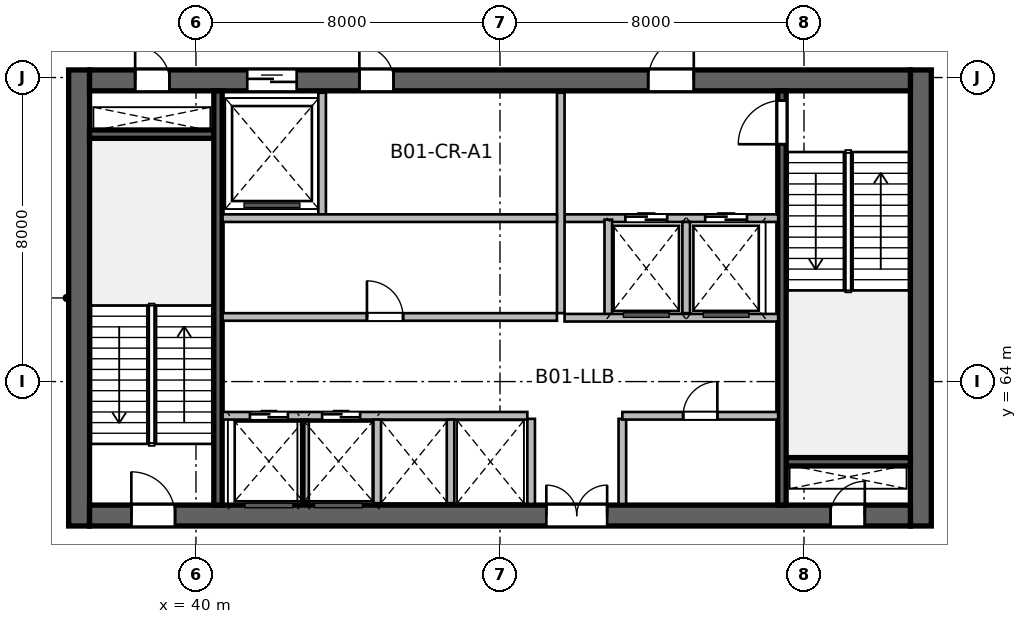
"""IFC4 building model, lengths in metres.
Left out: names, types, materials, properties, quantities, classifications, styles, units other than length and angle.
Written with IfcOpenShell. Run it as: python <this file> out.ifc"""

import sys

from ifc_helpers import new_model, si_unit, direction, frame, frame_2d, origin, place, context, subcontext, project, spatial, rectangle, extrude, source, transform, mapped, element, fill, save


model = new_model("IFC4")
c1 = context("Model", 3, precision=1e-05, world=origin(), true_north=direction((0.0, 1.0)))
c2 = subcontext(c1, "Body", "Model", "MODEL_VIEW")
j1 = project(units=[si_unit("LENGTHUNIT", "METRE"), si_unit("PLANEANGLEUNIT", "RADIAN")], contexts=[c1])
p1 = place(None, origin())
s1 = spatial("IfcSite", under=j1, at=p1, CompositionType="ELEMENT")
p2 = place(p1, origin())
s2 = spatial("IfcBuilding", under=s1, at=p2, CompositionType="ELEMENT")
p3 = place(p2, frame((0.0, 0.0, -5.0)))
s3 = spatial("IfcBuildingStorey", under=s2, at=p3, CompositionType="ELEMENT", Elevation=-5.0)
m1 = source(origin(), c2, "Body", "SweptSolid", [
    extrude(rectangle(XDim=12.0, YDim=0.55, at=frame_2d((6.0, 0.0))), origin(), (0.0, 0.0, 1.0), 5.0),
])
for number, where, z_axis, x_axis in (
    (1, (36.925, 60.2, 0.0), (0.0, 0.0, 1.0), (0.0, 1.0, 0.0)),
    (2, (59.075, 60.2, 0.0), (0.0, 0.0, 1.0), (0.0, 1.0, 0.0)),
):
    element("IfcWall", number, at=place(p3, frame(where, z_axis=z_axis, x_axis=x_axis)), inside=s3, PredefinedType="SHEAR", context=c2, shape_type="MappedRepresentation", body=[
        mapped(m1, transform((0.0, 0.0, 0.0), scale=1.0)),
    ])
m2 = source(origin(), c2, "Body", "SweptSolid", [
    extrude(rectangle(XDim=21.6, YDim=0.55, at=frame_2d((10.8, 0.0))), origin(), (0.0, 0.0, 1.0), 5.0),
])
p4 = place(p3, frame((37.2, 60.475, 0.0), z_axis=(0.0, 0.0, 1.0), x_axis=(1.0, 0.0, 0.0)))
e3 = element("IfcWall", 3, at=p4, inside=s3, PredefinedType="SHEAR", context=c2, shape_type="MappedRepresentation", body=[
    mapped(m2, transform((0.0, 0.0, 0.0), scale=1.0)),
])
p5 = place(p4, frame((1.1, 0.0, 0.0)))
e4 = element("IfcOpeningElement", 4, at=p5, cuts=e3, PredefinedType="OPENING", context=c2, shape_type="SweptSolid", body=[
    extrude(rectangle(XDim=1.15, YDim=2.15, at=frame_2d((0.575, 1.075))), frame((0.0, 0.285, 0.0), z_axis=(0.0, -1.0, 0.0), x_axis=(1.0, 0.0, 0.0)), (0.0, 0.0, 1.0), 0.57),
])
p6 = place(p4, frame((19.5, 0.0, 0.0)))
e5 = element("IfcOpeningElement", 5, at=p6, cuts=e3, PredefinedType="OPENING", context=c2, shape_type="SweptSolid", body=[
    extrude(rectangle(XDim=0.9, YDim=2.1, at=frame_2d((0.45, 1.05))), frame((0.0, 0.285, 0.0), z_axis=(0.0, -1.0, 0.0), x_axis=(1.0, 0.0, 0.0)), (0.0, 0.0, 1.0), 0.57),
])
p7 = place(p4, frame((12.02, 0.0, 0.0)))
e6 = element("IfcOpeningElement", 6, at=p7, cuts=e3, PredefinedType="OPENING", context=c2, shape_type="SweptSolid", body=[
    extrude(rectangle(XDim=1.6, YDim=2.15, at=frame_2d((0.8, 1.075))), frame((0.0, 0.285, 0.0), z_axis=(0.0, -1.0, 0.0), x_axis=(1.0, 0.0, 0.0)), (0.0, 0.0, 1.0), 0.57),
])
p8 = place(p3, frame((37.2, 71.925, 0.0), z_axis=(0.0, 0.0, 1.0), x_axis=(1.0, 0.0, 0.0)))
e7 = element("IfcWall", 7, at=p8, inside=s3, PredefinedType="SHEAR", context=c2, shape_type="MappedRepresentation", body=[
    mapped(m2, transform((0.0, 0.0, 0.0), scale=1.0)),
])
p9 = place(p8, frame((1.2, 0.0, 0.0)))
e8 = element("IfcOpeningElement", 8, at=p9, cuts=e7, PredefinedType="OPENING", context=c2, shape_type="SweptSolid", body=[
    extrude(rectangle(XDim=0.9, YDim=2.1, at=frame_2d((0.45, 1.05))), frame((0.0, 0.285, 0.0), z_axis=(0.0, -1.0, 0.0), x_axis=(1.0, 0.0, 0.0)), (0.0, 0.0, 1.0), 0.57),
])
p10 = place(p8, frame((14.7, 0.0, 0.0)))
e9 = element("IfcOpeningElement", 9, at=p10, cuts=e7, PredefinedType="OPENING", context=c2, shape_type="SweptSolid", body=[
    extrude(rectangle(XDim=1.2, YDim=2.15, at=frame_2d((0.6, 1.075))), frame((0.0, 0.285, 0.0), z_axis=(0.0, -1.0, 0.0), x_axis=(1.0, 0.0, 0.0)), (0.0, 0.0, 1.0), 0.57),
])
p11 = place(p8, frame((4.15, 0.0, 0.0)))
e10 = element("IfcOpeningElement", 10, at=p11, cuts=e7, PredefinedType="OPENING", context=c2, shape_type="SweptSolid", body=[
    extrude(rectangle(XDim=1.3, YDim=2.15, at=frame_2d((0.65, 1.075))), frame((0.0, 0.285, 0.0), z_axis=(0.0, -1.0, 0.0), x_axis=(1.0, 0.0, 0.0)), (0.0, 0.0, 1.0), 0.57),
])
p12 = place(p8, frame((7.1, 0.0, 0.0)))
e11 = element("IfcOpeningElement", 11, at=p12, cuts=e7, PredefinedType="OPENING", context=c2, shape_type="SweptSolid", body=[
    extrude(rectangle(XDim=0.9, YDim=2.1, at=frame_2d((0.45, 1.05))), frame((0.0, 0.285, 0.0), z_axis=(0.0, -1.0, 0.0), x_axis=(1.0, 0.0, 0.0)), (0.0, 0.0, 1.0), 0.57),
])
m3 = source(origin(), c2, "Body", "SweptSolid", [
    extrude(rectangle(XDim=3.27, YDim=0.22, at=frame_2d((1.635, 0.0))), origin(), (0.0, 0.0, 1.0), 5.0),
])
for number, where, z_axis, x_axis in (
    (12, (37.2, 70.51, 0.0), (0.0, 0.0, 1.0), (1.0, 0.0, 0.0)),
    (13, (55.53, 61.89, 0.0), (0.0, 0.0, 1.0), (1.0, 0.0, 0.0)),
):
    element("IfcWall", number, at=place(p3, frame(where, z_axis=z_axis, x_axis=x_axis)), inside=s3, PredefinedType="SHEAR", context=c2, shape_type="MappedRepresentation", body=[
        mapped(m3, transform((0.0, 0.0, 0.0), scale=1.0)),
    ])
m4 = source(origin(), c2, "Body", "SweptSolid", [
    extrude(rectangle(XDim=10.9, YDim=0.22, at=frame_2d((5.45, 0.0))), origin(), (0.0, 0.0, 1.0), 5.0),
])
p13 = place(p3, frame((40.58, 60.75, 0.0), z_axis=(0.0, 0.0, 1.0), x_axis=(0.0, 1.0, 0.0)))
e14 = element("IfcWall", 14, at=p13, inside=s3, PredefinedType="SHEAR", context=c2, shape_type="MappedRepresentation", body=[
    mapped(m4, transform((0.0, 0.0, 0.0), scale=1.0)),
])
p14 = place(p3, frame((55.42, 60.75, 0.0), z_axis=(0.0, 0.0, 1.0), x_axis=(0.0, 1.0, 0.0)))
e15 = element("IfcWall", 15, at=p14, inside=s3, PredefinedType="SHEAR", context=c2, shape_type="MappedRepresentation", body=[
    mapped(m4, transform((0.0, 0.0, 0.0), scale=1.0)),
])
p15 = place(p14, frame((9.495, 0.0, 0.0)))
e16 = element("IfcOpeningElement", 16, at=p15, cuts=e15, PredefinedType="OPENING", context=c2, shape_type="SweptSolid", body=[
    extrude(rectangle(XDim=1.15, YDim=2.15, at=frame_2d((0.575, 1.075))), frame((0.0, 0.12, 0.0), z_axis=(0.0, -1.0, 0.0), x_axis=(1.0, 0.0, 0.0)), (0.0, 0.0, 1.0), 0.24),
])
m5 = source(origin(), c2, "Body", "SweptSolid", [
    extrude(rectangle(XDim=2.24, YDim=0.2, at=frame_2d((1.12, 0.0))), origin(), (0.0, 0.0, 1.0), 4.7),
])
for number, where, z_axis, x_axis in (
    (17, (48.82, 60.78, 0.0), (0.0, 0.0, 1.0), (0.0, 1.0, 0.0)),
    (18, (51.22, 60.78, 0.0), (0.0, 0.0, 1.0), (0.0, 1.0, 0.0)),
):
    element("IfcWall", number, at=place(p3, frame(where, z_axis=z_axis, x_axis=x_axis)), inside=s3, PredefinedType="SOLIDWALL", context=c2, shape_type="MappedRepresentation", body=[
        mapped(m5, transform((0.0, 0.0, 0.0), scale=1.0)),
    ])
m6 = source(origin(), c2, "Body", "SweptSolid", [
    extrude(rectangle(XDim=5.62, YDim=0.2, at=frame_2d((2.81, 0.0))), origin(), (0.0, 0.0, 1.0), 4.7),
])
p16 = place(p3, frame((49.7, 68.3, 0.0), z_axis=(0.0, 0.0, 1.0), x_axis=(1.0, 0.0, 0.0)))
e19 = element("IfcWall", 19, at=p16, inside=s3, PredefinedType="SOLIDWALL", context=c2, shape_type="MappedRepresentation", body=[
    mapped(m6, transform((0.0, 0.0, 0.0), scale=1.0)),
])
p17 = place(p16, frame((1.6, 0.0, 0.0)))
e20 = element("IfcOpeningElement", 20, at=p17, cuts=e19, PredefinedType="OPENING", context=c2, shape_type="SweptSolid", body=[
    extrude(rectangle(XDim=1.1, YDim=2.15, at=frame_2d((0.55, 1.075))), frame((0.0, 0.11, 0.0), z_axis=(0.0, -1.0, 0.0), x_axis=(1.0, 0.0, 0.0)), (0.0, 0.0, 1.0), 0.22),
])
p18 = place(p16, frame((3.7, 0.0, 0.0)))
e21 = element("IfcOpeningElement", 21, at=p18, cuts=e19, PredefinedType="OPENING", context=c2, shape_type="SweptSolid", body=[
    extrude(rectangle(XDim=1.1, YDim=2.15, at=frame_2d((0.55, 1.075))), frame((0.0, 0.11, 0.0), z_axis=(0.0, -1.0, 0.0), x_axis=(1.0, 0.0, 0.0)), (0.0, 0.0, 1.0), 0.22),
])
m7 = source(origin(), c2, "Body", "SweptSolid", [
    extrude(rectangle(XDim=5.8, YDim=0.2, at=frame_2d((2.9, 0.0))), origin(), (0.0, 0.0, 1.0), 4.7),
])
p19 = place(p3, frame((49.6, 65.8, 0.0), z_axis=(0.0, 0.0, 1.0), x_axis=(0.0, 1.0, 0.0)))
e22 = element("IfcWall", 22, at=p19, inside=s3, PredefinedType="SOLIDWALL", context=c2, shape_type="MappedRepresentation", body=[
    mapped(m7, transform((0.0, 0.0, 0.0), scale=1.0)),
])
m8 = source(origin(), c2, "Body", "SweptSolid", [
    extrude(rectangle(XDim=2.58, YDim=0.2, at=frame_2d((1.29, 0.0))), origin(), (0.0, 0.0, 1.0), 4.7),
])
p20 = place(p3, frame((50.85, 65.68, 0.0), z_axis=(0.0, 0.0, 1.0), x_axis=(0.0, 1.0, 0.0)))
e23 = element("IfcWall", 23, at=p20, inside=s3, PredefinedType="SOLIDWALL", context=c2, shape_type="MappedRepresentation", body=[
    mapped(m8, transform((0.0, 0.0, 0.0), scale=1.0)),
])
m9 = source(origin(), c2, "Body", "SweptSolid", [
    extrude(rectangle(XDim=2.4, YDim=0.2, at=frame_2d((1.2, 0.0))), origin(), (0.0, 0.0, 1.0), 4.7),
])
p21 = place(p3, frame((52.9, 65.8, 0.0), z_axis=(0.0, 0.0, 1.0), x_axis=(0.0, 1.0, 0.0)))
e24 = element("IfcWall", 24, at=p21, inside=s3, PredefinedType="SOLIDWALL", context=c2, shape_type="MappedRepresentation", body=[
    mapped(m9, transform((0.0, 0.0, 0.0), scale=1.0)),
])
p22 = place(p3, frame((49.7, 65.68, 0.0), z_axis=(0.0, 0.0, 1.0), x_axis=(1.0, 0.0, 0.0)))
e25 = element("IfcWall", 25, at=p22, inside=s3, PredefinedType="SOLIDWALL", context=c2, shape_type="MappedRepresentation", body=[
    mapped(m6, transform((0.0, 0.0, 0.0), scale=1.0)),
])
m10 = source(origin(), c2, "Body", "SweptSolid", [
    extrude(rectangle(XDim=3.2, YDim=0.2, at=frame_2d((1.6, 0.0))), origin(), (0.0, 0.0, 1.0), 4.7),
])
p23 = place(p3, frame((43.32, 68.4, 0.0), z_axis=(0.0, 0.0, 1.0), x_axis=(0.0, 1.0, 0.0)))
e26 = element("IfcWall", 26, at=p23, inside=s3, PredefinedType="SOLIDWALL", context=c2, shape_type="MappedRepresentation", body=[
    mapped(m10, transform((0.0, 0.0, 0.0), scale=1.0)),
])
m11 = source(origin(), c2, "Body", "SweptSolid", [
    extrude(rectangle(XDim=8.8, YDim=0.2, at=frame_2d((4.4, 0.0))), origin(), (0.0, 0.0, 1.0), 4.7),
])
p24 = place(p3, frame((40.7, 68.3, 0.0), z_axis=(0.0, 0.0, 1.0), x_axis=(1.0, 0.0, 0.0)))
e27 = element("IfcWall", 27, at=p24, inside=s3, PredefinedType="SOLIDWALL", context=c2, shape_type="MappedRepresentation", body=[
    mapped(m11, transform((0.0, 0.0, 0.0), scale=1.0)),
])
m12 = source(origin(), c2, "Body", "SweptSolid", [
    extrude(rectangle(XDim=8.02, YDim=0.2, at=frame_2d((4.01, 0.0))), origin(), (0.0, 0.0, 1.0), 4.7),
])
p25 = place(p3, frame((40.7, 63.1, 0.0), z_axis=(0.0, 0.0, 1.0), x_axis=(1.0, 0.0, 0.0)))
e28 = element("IfcWall", 28, at=p25, inside=s3, PredefinedType="SOLIDWALL", context=c2, shape_type="MappedRepresentation", body=[
    mapped(m12, transform((0.0, 0.0, 0.0), scale=1.0)),
])
p26 = place(p25, frame((0.72, 0.0, 0.0)))
e29 = element("IfcOpeningElement", 29, at=p26, cuts=e28, PredefinedType="OPENING", context=c2, shape_type="SweptSolid", body=[
    extrude(rectangle(XDim=1.0, YDim=2.15, at=frame_2d((0.5, 1.075))), frame((0.0, 0.11, 0.0), z_axis=(0.0, -1.0, 0.0), x_axis=(1.0, 0.0, 0.0)), (0.0, 0.0, 1.0), 0.22),
])
p27 = place(p25, frame((2.62, 0.0, 0.0)))
e30 = element("IfcOpeningElement", 30, at=p27, cuts=e28, PredefinedType="OPENING", context=c2, shape_type="SweptSolid", body=[
    extrude(rectangle(XDim=1.0, YDim=2.15, at=frame_2d((0.5, 1.075))), frame((0.0, 0.11, 0.0), z_axis=(0.0, -1.0, 0.0), x_axis=(1.0, 0.0, 0.0)), (0.0, 0.0, 1.0), 0.22),
])
m13 = source(origin(), c2, "Body", "SweptSolid", [
    extrude(rectangle(XDim=4.1, YDim=0.2, at=frame_2d((2.05, 0.0))), origin(), (0.0, 0.0, 1.0), 4.7),
])
p28 = place(p3, frame((51.22, 63.1, 0.0), z_axis=(0.0, 0.0, 1.0), x_axis=(1.0, 0.0, 0.0)))
e31 = element("IfcWall", 31, at=p28, inside=s3, PredefinedType="SOLIDWALL", context=c2, shape_type="MappedRepresentation", body=[
    mapped(m13, transform((0.0, 0.0, 0.0), scale=1.0)),
])
p29 = place(p28, frame((1.6, 0.0, 0.0)))
e32 = element("IfcOpeningElement", 32, at=p29, cuts=e31, PredefinedType="OPENING", context=c2, shape_type="SweptSolid", body=[
    extrude(rectangle(XDim=0.9, YDim=2.1, at=frame_2d((0.45, 1.05))), frame((0.0, 0.11, 0.0), z_axis=(0.0, -1.0, 0.0), x_axis=(1.0, 0.0, 0.0)), (0.0, 0.0, 1.0), 0.22),
])
m14 = source(origin(), c2, "Body", "SweptSolid", [
    extrude(rectangle(XDim=2.2, YDim=0.2, at=frame_2d((1.1, 0.0))), origin(), (0.0, 0.0, 1.0), 4.7),
])
for number, where, z_axis, x_axis in (
    (33, (42.87, 60.8, 0.0), (0.0, 0.0, 1.0), (0.0, 1.0, 0.0)),
    (34, (44.77, 60.8, 0.0), (0.0, 0.0, 1.0), (0.0, 1.0, 0.0)),
    (35, (46.7, 60.8, 0.0), (0.0, 0.0, 1.0), (0.0, 1.0, 0.0)),
):
    element("IfcWall", number, at=place(p3, frame(where, z_axis=z_axis, x_axis=x_axis)), inside=s3, PredefinedType="SOLIDWALL", context=c2, shape_type="MappedRepresentation", body=[
        mapped(m14, transform((0.0, 0.0, 0.0), scale=1.0)),
    ])
p30 = place(p3, frame((40.7, 65.7, 0.0), z_axis=(0.0, 0.0, 1.0), x_axis=(1.0, 0.0, 0.0)))
e36 = element("IfcWall", 36, at=p30, inside=s3, PredefinedType="SOLIDWALL", context=c2, shape_type="MappedRepresentation", body=[
    mapped(m11, transform((0.0, 0.0, 0.0), scale=1.0)),
])
p31 = place(p30, frame((3.8, 0.0, 0.0)))
e37 = element("IfcOpeningElement", 37, at=p31, cuts=e36, PredefinedType="OPENING", context=c2, shape_type="SweptSolid", body=[
    extrude(rectangle(XDim=0.95, YDim=2.15, at=frame_2d((0.475, 1.075))), frame((0.0, 0.11, 0.0), z_axis=(0.0, -1.0, 0.0), x_axis=(1.0, 0.0, 0.0)), (0.0, 0.0, 1.0), 0.22),
])
m15 = source(origin(), c2, "Body", "SweptSolid", [
    extrude(rectangle(XDim=1.15, YDim=2.15, at=frame_2d((0.575, 1.075))), frame((0.0, 0.025, 0.0), z_axis=(0.0, -1.0, 0.0), x_axis=(1.0, 0.0, 0.0)), (0.0, 0.0, 1.0), 0.05),
])
p32 = place(p5, origin())
e38 = element("IfcDoor", 38, at=p32, inside=s3, OperationType="SINGLE_SWING_LEFT", PredefinedType="DOOR", context=c2, shape_type="MappedRepresentation", body=[
    mapped(m15, transform((0.0, 0.0, 0.0), scale=1.0)),
])
fill(e4, e38)
m16 = source(origin(), c2, "Body", "SweptSolid", [
    extrude(rectangle(XDim=0.9, YDim=2.1, at=frame_2d((0.45, 1.05))), frame((0.0, 0.025, 0.0), z_axis=(0.0, -1.0, 0.0), x_axis=(1.0, 0.0, 0.0)), (0.0, 0.0, 1.0), 0.05),
])
p33 = place(p9, origin())
e39 = element("IfcDoor", 39, at=p33, inside=s3, OperationType="SINGLE_SWING_LEFT", PredefinedType="DOOR", context=c2, shape_type="MappedRepresentation", body=[
    mapped(m16, transform((0.0, 0.0, 0.0), scale=1.0)),
])
fill(e8, e39)
p34 = place(p6, origin())
e40 = element("IfcDoor", 40, at=p34, inside=s3, OperationType="SINGLE_SWING_RIGHT", PredefinedType="DOOR", context=c2, shape_type="MappedRepresentation", body=[
    mapped(m16, transform((0.0, 0.0, 0.0), scale=1.0)),
])
fill(e5, e40)
p35 = place(p15, origin())
e41 = element("IfcDoor", 41, at=p35, inside=s3, OperationType="SINGLE_SWING_LEFT", PredefinedType="DOOR", context=c2, shape_type="MappedRepresentation", body=[
    mapped(m15, transform((0.0, 0.0, 0.0), scale=1.0)),
])
fill(e16, e41)
m17 = source(origin(), c2, "Body", "SweptSolid", [
    extrude(rectangle(XDim=1.6, YDim=2.15, at=frame_2d((0.8, 1.075))), frame((0.0, 0.025, 0.0), z_axis=(0.0, -1.0, 0.0), x_axis=(1.0, 0.0, 0.0)), (0.0, 0.0, 1.0), 0.05),
])
p36 = place(p7, origin())
e42 = element("IfcDoor", 42, at=p36, inside=s3, OperationType="DOUBLE_DOOR_SINGLE_SWING", PredefinedType="DOOR", context=c2, shape_type="MappedRepresentation", body=[
    mapped(m17, transform((0.0, 0.0, 0.0), scale=1.0)),
])
fill(e6, e42)
m18 = source(origin(), c2, "Body", "SweptSolid", [
    extrude(rectangle(XDim=1.2, YDim=2.15, at=frame_2d((0.6, 1.075))), frame((0.0, 0.025, 0.0), z_axis=(0.0, -1.0, 0.0), x_axis=(1.0, 0.0, 0.0)), (0.0, 0.0, 1.0), 0.05),
])
p37 = place(p10, origin())
e43 = element("IfcDoor", 43, at=p37, inside=s3, OperationType="SINGLE_SWING_RIGHT", PredefinedType="DOOR", context=c2, shape_type="MappedRepresentation", body=[
    mapped(m18, transform((0.0, 0.0, 0.0), scale=1.0)),
])
fill(e9, e43)
m19 = source(origin(), c2, "Body", "SweptSolid", [
    extrude(rectangle(XDim=1.1, YDim=2.15, at=frame_2d((0.55, 1.075))), frame((0.0, 0.025, 0.0), z_axis=(0.0, -1.0, 0.0), x_axis=(1.0, 0.0, 0.0)), (0.0, 0.0, 1.0), 0.05),
])
p38 = place(p17, origin())
e44 = element("IfcDoor", 44, at=p38, inside=s3, OperationType="DOUBLE_DOOR_SLIDING", PredefinedType="DOOR", context=c2, shape_type="MappedRepresentation", body=[
    mapped(m19, transform((0.0, 0.0, 0.0), scale=1.0)),
])
fill(e20, e44)
p39 = place(p18, origin())
e45 = element("IfcDoor", 45, at=p39, inside=s3, OperationType="DOUBLE_DOOR_SLIDING", PredefinedType="DOOR", context=c2, shape_type="MappedRepresentation", body=[
    mapped(m19, transform((0.0, 0.0, 0.0), scale=1.0)),
])
fill(e21, e45)
m20 = source(origin(), c2, "Body", "SweptSolid", [
    extrude(rectangle(XDim=1.3, YDim=2.15, at=frame_2d((0.65, 1.075))), frame((0.0, 0.025, 0.0), z_axis=(0.0, -1.0, 0.0), x_axis=(1.0, 0.0, 0.0)), (0.0, 0.0, 1.0), 0.05),
])
p40 = place(p11, origin())
e46 = element("IfcDoor", 46, at=p40, inside=s3, OperationType="DOUBLE_DOOR_SLIDING", PredefinedType="DOOR", context=c2, shape_type="MappedRepresentation", body=[
    mapped(m20, transform((0.0, 0.0, 0.0), scale=1.0)),
])
fill(e10, e46)
p41 = place(p12, origin())
e47 = element("IfcDoor", 47, at=p41, inside=s3, OperationType="SINGLE_SWING_LEFT", PredefinedType="DOOR", context=c2, shape_type="MappedRepresentation", body=[
    mapped(m16, transform((0.0, 0.0, 0.0), scale=1.0)),
])
fill(e11, e47)
m21 = source(origin(), c2, "Body", "SweptSolid", [
    extrude(rectangle(XDim=1.0, YDim=2.15, at=frame_2d((0.5, 1.075))), frame((0.0, 0.025, 0.0), z_axis=(0.0, -1.0, 0.0), x_axis=(1.0, 0.0, 0.0)), (0.0, 0.0, 1.0), 0.05),
])
p42 = place(p26, origin())
e48 = element("IfcDoor", 48, at=p42, inside=s3, OperationType="DOUBLE_DOOR_SLIDING", PredefinedType="DOOR", context=c2, shape_type="MappedRepresentation", body=[
    mapped(m21, transform((0.0, 0.0, 0.0), scale=1.0)),
])
fill(e29, e48)
p43 = place(p27, origin())
e49 = element("IfcDoor", 49, at=p43, inside=s3, OperationType="DOUBLE_DOOR_SLIDING", PredefinedType="DOOR", context=c2, shape_type="MappedRepresentation", body=[
    mapped(m21, transform((0.0, 0.0, 0.0), scale=1.0)),
])
fill(e30, e49)
p44 = place(p29, origin())
e50 = element("IfcDoor", 50, at=p44, inside=s3, OperationType="SINGLE_SWING_RIGHT", PredefinedType="DOOR", context=c2, shape_type="MappedRepresentation", body=[
    mapped(m16, transform((0.0, 0.0, 0.0), scale=1.0)),
])
fill(e32, e50)
m22 = source(origin(), c2, "Body", "SweptSolid", [
    extrude(rectangle(XDim=0.95, YDim=2.15, at=frame_2d((0.475, 1.075))), frame((0.0, 0.025, 0.0), z_axis=(0.0, -1.0, 0.0), x_axis=(1.0, 0.0, 0.0)), (0.0, 0.0, 1.0), 0.05),
])
p45 = place(p31, origin())
e51 = element("IfcDoor", 51, at=p45, inside=s3, OperationType="SINGLE_SWING_LEFT", PredefinedType="DOOR", context=c2, shape_type="MappedRepresentation", body=[
    mapped(m22, transform((0.0, 0.0, 0.0), scale=1.0)),
])
fill(e37, e51)
save(model, sys.argv[1])
